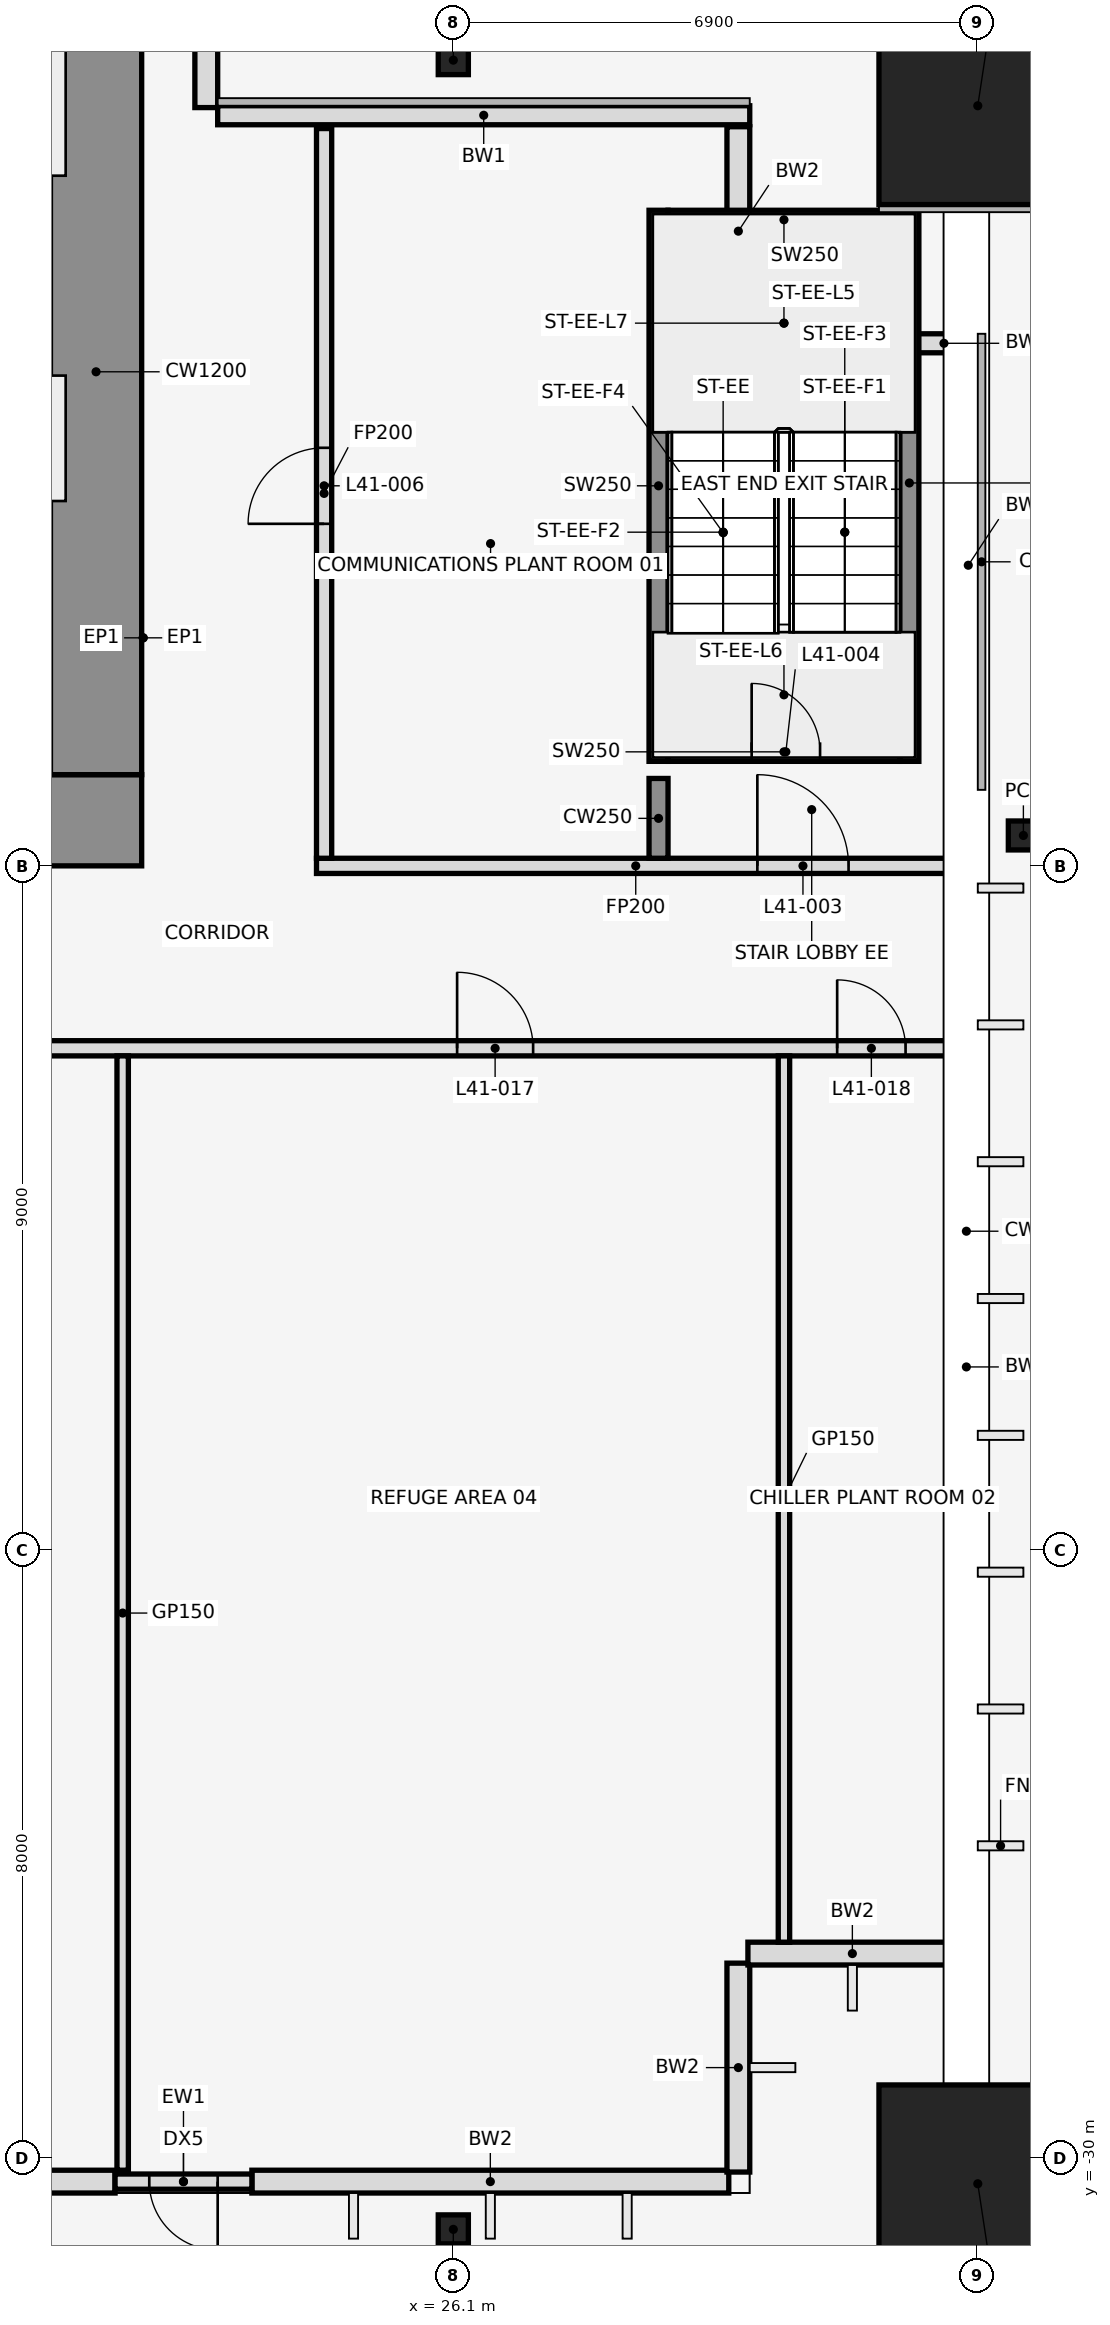
"""IFC4 building model, lengths in metres.
Left out: names, types, materials, properties, quantities, classifications, styles, units other than length and angle.
Written with IfcOpenShell. Run it as: python <this file> out.ifc"""

import sys

from ifc_helpers import new_model, si_unit, direction, frame, frame_2d, origin, origin_2d, place, context, subcontext, project, spatial, rectangle, hollow_rectangle, i_section, extrude, element, fill, save


model = new_model("IFC4")
c1 = context("Model", 3, precision=1e-05, world=origin(), true_north=direction((0.0, 1.0)))
c2 = subcontext(c1, "Body", "Model", "MODEL_VIEW")
j1 = project(units=[si_unit("LENGTHUNIT", "METRE"), si_unit("PLANEANGLEUNIT", "RADIAN")], contexts=[c1])
p1 = place(None, origin())
s1 = spatial("IfcSite", under=j1, at=p1, CompositionType="ELEMENT")
p2 = place(p1, origin())
s2 = spatial("IfcBuilding", under=s1, at=p2, CompositionType="ELEMENT")
p3 = place(p2, frame((0.0, 0.0, 185.5)))
s3 = spatial("IfcBuildingStorey", under=s2, at=p3, CompositionType="ELEMENT", Elevation=185.5)
for number, where, z_axis, x_axis in (
    (1, (26.1, -30.938, 0.0), (0.0, 0.0, 1.0), (1.0, 0.0, 0.0)),
    (2, (26.1, -2.4, 0.0), (0.0, 0.0, 1.0), (1.0, 0.0, 0.0)),
):
    element("IfcColumn", number, at=place(p3, frame(where, z_axis=z_axis, x_axis=x_axis)), inside=s3, PredefinedType="COLUMN", context=c2, shape_type="SweptSolid", body=[
        extrude(i_section(OverallWidth=0.396, OverallDepth=0.381, WebThickness=0.019, FlangeThickness=0.03, at=origin_2d()), origin(), (0.0, 0.0, 1.0), 5.4),
    ])
for number, where, z_axis, x_axis in (
    (3, (33.0, -30.338, 0.0), (0.0, 0.0, 1.0), (1.0, 0.0, 0.0)),
    (4, (33.0, -3.0, 0.0), (0.0, 0.0, 1.0), (1.0, 0.0, 0.0)),
):
    element("IfcColumn", number, at=place(p3, frame(where, z_axis=z_axis, x_axis=x_axis)), inside=s3, PredefinedType="COLUMN", context=c2, shape_type="SweptSolid", body=[
        extrude(hollow_rectangle(XDim=2.6, YDim=2.6, WallThickness=0.08, at=origin_2d()), origin(), (0.0, 0.0, 1.0), 5.4),
    ])
p4 = place(p3, frame((33.6, -12.6, 0.0), z_axis=(0.0, 0.0, 1.0), x_axis=(1.0, 0.0, 0.0)))
e5 = element("IfcColumn", 5, at=p4, inside=s3, PredefinedType="COLUMN", context=c2, shape_type="SweptSolid", body=[
    extrude(i_section(OverallWidth=0.396, OverallDepth=0.381, WebThickness=0.019, FlangeThickness=0.03, at=origin_2d()), origin(), (0.0, 0.0, 1.0), 5.4),
])
p5 = place(p3, frame((32.85, -27.184, 0.0), z_axis=(0.0, 0.0, 1.0), x_axis=(0.0, 1.0, 0.0)))
e6 = element("IfcWall", 6, at=p5, inside=s3, PredefinedType="STANDARD", context=c2, shape_type="SweptSolid", body=[
    extrude(rectangle(XDim=15.184, YDim=0.3, at=frame_2d((7.592, 0.0))), origin(), (0.0, 0.0, 1.0), 4.338),
])
for number, where, z_axis, x_axis in (
    (7, (29.85, -6.024, 0.0), (0.0, 0.0, 1.0), (0.0, 1.0, 0.0)),
    (8, (22.85, -3.024, 0.0), (0.0, 0.0, 1.0), (0.0, 1.0, 0.0)),
):
    element("IfcWall", number, at=place(p3, frame(where, z_axis=z_axis, x_axis=x_axis)), inside=s3, PredefinedType="STANDARD", context=c2, shape_type="SweptSolid", body=[
        extrude(rectangle(XDim=2.748, YDim=0.3, at=frame_2d((1.374, 0.0))), origin(), (0.0, 0.0, 1.0), 5.25),
    ])
p6 = place(p3, frame((15.615, -30.31, 0.0), z_axis=(0.0, 0.0, 1.0), x_axis=(1.0, 0.0, 0.0)))
e9 = element("IfcWall", 9, at=p6, inside=s3, PredefinedType="STANDARD", context=c2, shape_type="SweptSolid", body=[
    extrude(rectangle(XDim=6.035, YDim=0.3, at=frame_2d((3.018, 0.0))), origin(), (0.0, 0.0, 1.0), 4.414),
])
p7 = place(p3, frame((23.45, -30.31, 0.0), z_axis=(0.0, 0.0, 1.0), x_axis=(1.0, 0.0, 0.0)))
e10 = element("IfcWall", 10, at=p7, inside=s3, PredefinedType="STANDARD", context=c2, shape_type="SweptSolid", body=[
    extrude(rectangle(XDim=6.274, YDim=0.3, at=frame_2d((3.137, 0.0))), origin(), (0.0, 0.0, 1.0), 4.414),
])
for number, where, z_axis, x_axis in (
    (11, (29.85, -30.184, 0.0), (0.0, 0.0, 1.0), (0.0, 1.0, 0.0)),
    (12, (29.976, -27.31, 0.0), (0.0, 0.0, 1.0), (1.0, 0.0, 0.0)),
):
    element("IfcWall", number, at=place(p3, frame(where, z_axis=z_axis, x_axis=x_axis)), inside=s3, PredefinedType="STANDARD", context=c2, shape_type="SweptSolid", body=[
        extrude(rectangle(XDim=2.748, YDim=0.3, at=frame_2d((1.374, 0.0))), origin(), (0.0, 0.0, 1.0), 4.414),
    ])
p8 = place(p3, frame((23.45, -30.31, 0.0), z_axis=(0.0, 0.0, 1.0), x_axis=(-1.0, 0.0, 0.0)))
e13 = element("IfcWall", 13, at=p8, inside=s3, PredefinedType="STANDARD", context=c2, shape_type="SweptSolid", body=[
    extrude(rectangle(XDim=1.8, YDim=0.2, at=frame_2d((0.9, 0.0))), origin(), (0.0, 0.0, 1.0), 5.25),
])
p9 = place(p8, frame((0.45, 0.0, 0.0)))
e14 = element("IfcOpeningElement", 14, at=p9, cuts=e13, PredefinedType="OPENING", context=c2, shape_type="SweptSolid", body=[
    extrude(rectangle(XDim=0.9, YDim=2.1, at=frame_2d((0.45, 1.05))), frame((0.0, 0.112, 0.0), z_axis=(0.0, -1.0, 0.0), x_axis=(1.0, 0.0, 0.0)), (0.0, 0.0, 1.0), 0.224),
])
p10 = place(p3, frame((32.875, -12.09, 0.0), z_axis=(0.0, 0.0, 1.0), x_axis=(0.0, 1.0, 0.0)))
e15 = element("IfcWall", 15, at=p10, inside=s3, PredefinedType="STANDARD", context=c2, shape_type="SweptSolid", body=[
    extrude(rectangle(XDim=6.09, YDim=0.25, at=frame_2d((3.045, 0.0))), origin(), (0.0, 0.0, 1.0), 5.25),
])
p11 = place(p3, frame((33.0, -6.125, 0.0), z_axis=(0.0, 0.0, 1.0), x_axis=(-1.0, 0.0, 0.0)))
e16 = element("IfcWall", 16, at=p11, inside=s3, PredefinedType="STANDARD", context=c2, shape_type="SweptSolid", body=[
    extrude(rectangle(XDim=0.89, YDim=0.25, at=frame_2d((0.445, 0.0))), origin(), (0.0, 0.0, 1.0), 5.25),
])
p12 = place(p3, frame((30.0, -3.125, 0.0), z_axis=(0.0, 0.0, 1.0), x_axis=(-1.0, 0.0, 0.0)))
e17 = element("IfcWall", 17, at=p12, inside=s3, PredefinedType="STANDARD", context=c2, shape_type="SweptSolid", body=[
    extrude(rectangle(XDim=7.0, YDim=0.25, at=frame_2d((3.5, 0.0))), origin(), (0.0, 0.0, 1.0), 5.25),
])
p13 = place(p3, frame((28.8, -11.625, 0.0), z_axis=(0.0, 0.0, 1.0), x_axis=(0.0, 1.0, 0.0)))
e18 = element("IfcWall", 18, at=p13, inside=s3, PredefinedType="SHEAR", context=c2, shape_type="SweptSolid", body=[
    extrude(rectangle(XDim=7.25, YDim=0.25, at=frame_2d((3.625, 0.0))), origin(), (0.0, 0.0, 1.0), 5.4),
])
p14 = place(p3, frame((32.1, -11.625, 0.0), z_axis=(0.0, 0.0, 1.0), x_axis=(0.0, 1.0, 0.0)))
e19 = element("IfcWall", 19, at=p14, inside=s3, PredefinedType="SHEAR", context=c2, shape_type="SweptSolid", body=[
    extrude(rectangle(XDim=7.325, YDim=0.25, at=frame_2d((3.663, 0.0))), origin(), (0.0, 0.0, 1.0), 5.4),
])
p15 = place(p3, frame((28.925, -11.5, 0.0), z_axis=(0.0, 0.0, 1.0), x_axis=(1.0, 0.0, 0.0)))
e20 = element("IfcWall", 20, at=p15, inside=s3, PredefinedType="SHEAR", context=c2, shape_type="SweptSolid", body=[
    extrude(rectangle(XDim=3.05, YDim=0.25, at=frame_2d((1.525, 0.0))), origin(), (0.0, 0.0, 1.0), 5.4),
])
p16 = place(p15, frame((1.1, 0.0, 0.0)))
e21 = element("IfcOpeningElement", 21, at=p16, cuts=e20, PredefinedType="OPENING", context=c2, shape_type="SweptSolid", body=[
    extrude(rectangle(XDim=0.9, YDim=2.1, at=frame_2d((0.45, 1.05))), frame((0.0, 0.137, 0.0), z_axis=(0.0, -1.0, 0.0), x_axis=(1.0, 0.0, 0.0)), (0.0, 0.0, 1.0), 0.274),
])
p17 = place(p3, frame((28.925, -4.5, 0.0), z_axis=(0.0, 0.0, 1.0), x_axis=(1.0, 0.0, 0.0)))
e22 = element("IfcWall", 22, at=p17, inside=s3, PredefinedType="SHEAR", context=c2, shape_type="SweptSolid", body=[
    extrude(rectangle(XDim=3.05, YDim=0.25, at=frame_2d((1.525, 0.0))), origin(), (0.0, 0.0, 1.0), 5.4),
])
p18 = place(p3, frame((-32.7, -15.4, 0.0), z_axis=(0.0, 0.0, 1.0), x_axis=(1.0, 0.0, 0.0)))
e23 = element("IfcWall", 23, at=p18, inside=s3, PredefinedType="PARTITIONING", context=c2, shape_type="SweptSolid", body=[
    extrude(rectangle(XDim=65.4, YDim=0.2, at=frame_2d((32.7, 0.0))), origin(), (0.0, 0.0, 1.0), 4.26),
])
p19 = place(p18, frame((0.7, 0.0, 0.0)))
e24 = element("IfcOpeningElement", 24, at=p19, cuts=e23, PredefinedType="OPENING", context=c2, shape_type="SweptSolid", body=[
    extrude(rectangle(XDim=0.9, YDim=2.1, at=frame_2d((0.45, 1.05))), frame((0.0, 0.112, 0.0), z_axis=(0.0, -1.0, 0.0), x_axis=(1.0, 0.0, 0.0)), (0.0, 0.0, 1.0), 0.224),
])
p20 = place(p18, frame((5.55, 0.0, 0.0)))
e25 = element("IfcOpeningElement", 25, at=p20, cuts=e23, PredefinedType="OPENING", context=c2, shape_type="SweptSolid", body=[
    extrude(rectangle(XDim=1.0, YDim=2.1, at=frame_2d((0.5, 1.05))), frame((0.0, 0.112, 0.0), z_axis=(0.0, -1.0, 0.0), x_axis=(1.0, 0.0, 0.0)), (0.0, 0.0, 1.0), 0.224),
])
p21 = place(p18, frame((14.85, 0.0, 0.0)))
e26 = element("IfcOpeningElement", 26, at=p21, cuts=e23, PredefinedType="OPENING", context=c2, shape_type="SweptSolid", body=[
    extrude(rectangle(XDim=0.9, YDim=2.1, at=frame_2d((0.45, 1.05))), frame((0.0, 0.112, 0.0), z_axis=(0.0, -1.0, 0.0), x_axis=(1.0, 0.0, 0.0)), (0.0, 0.0, 1.0), 0.224),
])
p22 = place(p18, frame((23.55, 0.0, 0.0)))
e27 = element("IfcOpeningElement", 27, at=p22, cuts=e23, PredefinedType="OPENING", context=c2, shape_type="SweptSolid", body=[
    extrude(rectangle(XDim=1.0, YDim=2.1, at=frame_2d((0.5, 1.05))), frame((0.0, 0.112, 0.0), z_axis=(0.0, -1.0, 0.0), x_axis=(1.0, 0.0, 0.0)), (0.0, 0.0, 1.0), 0.224),
])
p23 = place(p18, frame((32.15, 0.0, 0.0)))
e28 = element("IfcOpeningElement", 28, at=p23, cuts=e23, PredefinedType="OPENING", context=c2, shape_type="SweptSolid", body=[
    extrude(rectangle(XDim=1.0, YDim=2.1, at=frame_2d((0.5, 1.05))), frame((0.0, 0.112, 0.0), z_axis=(0.0, -1.0, 0.0), x_axis=(1.0, 0.0, 0.0)), (0.0, 0.0, 1.0), 0.224),
])
p24 = place(p18, frame((40.95, 0.0, 0.0)))
e29 = element("IfcOpeningElement", 29, at=p24, cuts=e23, PredefinedType="OPENING", context=c2, shape_type="SweptSolid", body=[
    extrude(rectangle(XDim=1.0, YDim=2.1, at=frame_2d((0.5, 1.05))), frame((0.0, 0.112, 0.0), z_axis=(0.0, -1.0, 0.0), x_axis=(1.0, 0.0, 0.0)), (0.0, 0.0, 1.0), 0.224),
])
p25 = place(p18, frame((49.55, 0.0, 0.0)))
e30 = element("IfcOpeningElement", 30, at=p25, cuts=e23, PredefinedType="OPENING", context=c2, shape_type="SweptSolid", body=[
    extrude(rectangle(XDim=1.0, YDim=2.1, at=frame_2d((0.5, 1.05))), frame((0.0, 0.112, 0.0), z_axis=(0.0, -1.0, 0.0), x_axis=(1.0, 0.0, 0.0)), (0.0, 0.0, 1.0), 0.224),
])
p26 = place(p18, frame((58.85, 0.0, 0.0)))
e31 = element("IfcOpeningElement", 31, at=p26, cuts=e23, PredefinedType="OPENING", context=c2, shape_type="SweptSolid", body=[
    extrude(rectangle(XDim=1.0, YDim=2.1, at=frame_2d((0.5, 1.05))), frame((0.0, 0.112, 0.0), z_axis=(0.0, -1.0, 0.0), x_axis=(1.0, 0.0, 0.0)), (0.0, 0.0, 1.0), 0.224),
])
p27 = place(p18, frame((63.85, 0.0, 0.0)))
e32 = element("IfcOpeningElement", 32, at=p27, cuts=e23, PredefinedType="OPENING", context=c2, shape_type="SweptSolid", body=[
    extrude(rectangle(XDim=0.9, YDim=2.1, at=frame_2d((0.45, 1.05))), frame((0.0, 0.112, 0.0), z_axis=(0.0, -1.0, 0.0), x_axis=(1.0, 0.0, 0.0)), (0.0, 0.0, 1.0), 0.224),
])
p28 = place(p3, frame((24.3, -13.0, 0.0), z_axis=(0.0, 0.0, 1.0), x_axis=(1.0, 0.0, 0.0)))
e33 = element("IfcWall", 33, at=p28, inside=s3, PredefinedType="PARTITIONING", context=c2, shape_type="SweptSolid", body=[
    extrude(rectangle(XDim=8.4, YDim=0.2, at=frame_2d((4.2, 0.0))), origin(), (0.0, 0.0, 1.0), 4.26),
])
p29 = place(p28, frame((5.8, 0.0, 0.0)))
e34 = element("IfcOpeningElement", 34, at=p29, cuts=e33, PredefinedType="OPENING", context=c2, shape_type="SweptSolid", body=[
    extrude(rectangle(XDim=1.2, YDim=2.1, at=frame_2d((0.6, 1.05))), frame((0.0, 0.112, 0.0), z_axis=(0.0, -1.0, 0.0), x_axis=(1.0, 0.0, 0.0)), (0.0, 0.0, 1.0), 0.224),
])
p30 = place(p3, frame((21.75, -30.16, 0.0), z_axis=(0.0, 0.0, 1.0), x_axis=(0.0, 1.0, 0.0)))
e35 = element("IfcWall", 35, at=p30, inside=s3, PredefinedType="PARTITIONING", context=c2, shape_type="SweptSolid", body=[
    extrude(rectangle(XDim=14.66, YDim=0.15, at=frame_2d((7.33, 0.0))), origin(), (0.0, 0.0, 1.0), 4.26),
])
p31 = place(p3, frame((24.4, -12.9, 0.0), z_axis=(0.0, 0.0, 1.0), x_axis=(0.0, 1.0, 0.0)))
e36 = element("IfcWall", 36, at=p31, inside=s3, PredefinedType="PARTITIONING", context=c2, shape_type="SweptSolid", body=[
    extrude(rectangle(XDim=9.6, YDim=0.2, at=frame_2d((4.8, 0.0))), origin(), (0.0, 0.0, 1.0), 4.26),
])
p32 = place(p31, frame((4.4, 0.0, 0.0)))
e37 = element("IfcOpeningElement", 37, at=p32, cuts=e36, PredefinedType="OPENING", context=c2, shape_type="SweptSolid", body=[
    extrude(rectangle(XDim=1.0, YDim=2.1, at=frame_2d((0.5, 1.05))), frame((0.0, 0.112, 0.0), z_axis=(0.0, -1.0, 0.0), x_axis=(1.0, 0.0, 0.0)), (0.0, 0.0, 1.0), 0.224),
])
p33 = place(p3, frame((28.8, -12.9, 0.0), z_axis=(0.0, 0.0, 1.0), x_axis=(0.0, 1.0, 0.0)))
e38 = element("IfcWall", 38, at=p33, inside=s3, PredefinedType="SHEAR", context=c2, shape_type="SweptSolid", body=[
    extrude(rectangle(XDim=1.05, YDim=0.25, at=frame_2d((0.525, 0.0))), origin(), (0.0, 0.0, 1.0), 5.4),
])
p34 = place(p3, frame((30.45, -27.16, 0.0), z_axis=(0.0, 0.0, 1.0), x_axis=(0.0, 1.0, 0.0)))
e39 = element("IfcWall", 39, at=p34, inside=s3, PredefinedType="PARTITIONING", context=c2, shape_type="SweptSolid", body=[
    extrude(rectangle(XDim=11.66, YDim=0.15, at=frame_2d((5.83, 0.0))), origin(), (0.0, 0.0, 1.0), 4.26),
])
p35 = place(p3, frame((-22.0, -12.4, 0.0), z_axis=(0.0, 0.0, 1.0), x_axis=(1.0, 0.0, 0.0)))
e40 = element("IfcWall", 40, at=p35, inside=s3, PredefinedType="SHEAR", context=c2, shape_type="SweptSolid", body=[
    extrude(rectangle(XDim=44.0, YDim=1.2, at=frame_2d((22.0, 0.0))), origin(), (0.0, 0.0, 1.0), 5.4),
])
p36 = place(p35, frame((2.2, 0.0, 0.0)))
e41 = element("IfcOpeningElement", 41, at=p36, cuts=e40, PredefinedType="OPENING", context=c2, shape_type="SweptSolid", body=[
    extrude(rectangle(XDim=1.2, YDim=2.1, at=frame_2d((0.6, 1.05))), frame((0.0, 0.612, 0.0), z_axis=(0.0, -1.0, 0.0), x_axis=(1.0, 0.0, 0.0)), (0.0, 0.0, 1.0), 1.224),
])
p37 = place(p35, frame((21.4, 0.0, 0.0)))
e42 = element("IfcOpeningElement", 42, at=p37, cuts=e40, PredefinedType="OPENING", context=c2, shape_type="SweptSolid", body=[
    extrude(rectangle(XDim=1.2, YDim=2.1, at=frame_2d((0.6, 1.05))), frame((0.0, 0.612, 0.0), z_axis=(0.0, -1.0, 0.0), x_axis=(1.0, 0.0, 0.0)), (0.0, 0.0, 1.0), 1.224),
])
p38 = place(p35, frame((40.6, 0.0, 0.0)))
e43 = element("IfcOpeningElement", 43, at=p38, cuts=e40, PredefinedType="OPENING", context=c2, shape_type="SweptSolid", body=[
    extrude(rectangle(XDim=1.2, YDim=2.1, at=frame_2d((0.6, 1.05))), frame((0.0, 0.612, 0.0), z_axis=(0.0, -1.0, 0.0), x_axis=(1.0, 0.0, 0.0)), (0.0, 0.0, 1.0), 1.224),
])
p39 = place(p35, frame((16.0, 0.0, 0.0)))
e44 = element("IfcOpeningElement", 44, at=p39, cuts=e40, PredefinedType="OPENING", context=c2, shape_type="SweptSolid", body=[
    extrude(rectangle(XDim=1.8, YDim=2.1, at=frame_2d((0.9, 1.05))), frame((0.0, 0.612, 0.0), z_axis=(0.0, -1.0, 0.0), x_axis=(1.0, 0.0, 0.0)), (0.0, 0.0, 1.0), 1.224),
])
p40 = place(p35, frame((6.3, 0.0, 0.0)))
e45 = element("IfcOpeningElement", 45, at=p40, cuts=e40, PredefinedType="OPENING", context=c2, shape_type="SweptSolid", body=[
    extrude(rectangle(XDim=1.2, YDim=2.1, at=frame_2d((0.6, 1.05))), frame((0.0, 0.612, 0.0), z_axis=(0.0, -1.0, 0.0), x_axis=(1.0, 0.0, 0.0)), (0.0, 0.0, 1.0), 1.224),
])
p41 = place(p35, frame((26.2, 0.0, 0.0)))
e46 = element("IfcOpeningElement", 46, at=p41, cuts=e40, PredefinedType="OPENING", context=c2, shape_type="SweptSolid", body=[
    extrude(rectangle(XDim=1.8, YDim=2.1, at=frame_2d((0.9, 1.05))), frame((0.0, 0.612, 0.0), z_axis=(0.0, -1.0, 0.0), x_axis=(1.0, 0.0, 0.0)), (0.0, 0.0, 1.0), 1.224),
])
p42 = place(p35, frame((36.5, 0.0, 0.0)))
e47 = element("IfcOpeningElement", 47, at=p42, cuts=e40, PredefinedType="OPENING", context=c2, shape_type="SweptSolid", body=[
    extrude(rectangle(XDim=1.2, YDim=2.1, at=frame_2d((0.6, 1.05))), frame((0.0, 0.612, 0.0), z_axis=(0.0, -1.0, 0.0), x_axis=(1.0, 0.0, 0.0)), (0.0, 0.0, 1.0), 1.224),
])
p43 = place(p3, frame((21.4, -11.8, 0.0), z_axis=(0.0, 0.0, 1.0), x_axis=(0.0, 1.0, 0.0)))
e48 = element("IfcWall", 48, at=p43, inside=s3, PredefinedType="SHEAR", context=c2, shape_type="SweptSolid", body=[
    extrude(rectangle(XDim=10.6, YDim=1.2, at=frame_2d((5.3, 0.0))), origin(), (0.0, 0.0, 1.0), 5.4),
])
p44 = place(p9, origin())
e49 = element("IfcDoor", 49, at=p44, inside=s3, OperationType="SINGLE_SWING_LEFT", PredefinedType="DOOR", context=c2, shape_type="SweptSolid", body=[
    extrude(rectangle(XDim=0.9, YDim=2.1, at=frame_2d((0.45, 1.05))), frame((0.0, 0.025, 0.0), z_axis=(0.0, -1.0, 0.0), x_axis=(1.0, 0.0, 0.0)), (0.0, 0.0, 1.0), 0.05),
])
fill(e14, e49)
p45 = place(p29, origin())
e50 = element("IfcDoor", 50, at=p45, inside=s3, OperationType="SINGLE_SWING_RIGHT", PredefinedType="DOOR", context=c2, shape_type="SweptSolid", body=[
    extrude(rectangle(XDim=1.2, YDim=2.1, at=frame_2d((0.6, 1.05))), frame((0.0, 0.025, 0.0), z_axis=(0.0, -1.0, 0.0), x_axis=(1.0, 0.0, 0.0)), (0.0, 0.0, 1.0), 0.05),
])
fill(e34, e50)
p46 = place(p16, origin())
e51 = element("IfcDoor", 51, at=p46, inside=s3, OperationType="SINGLE_SWING_LEFT", PredefinedType="DOOR", context=c2, shape_type="SweptSolid", body=[
    extrude(rectangle(XDim=0.9, YDim=2.1, at=frame_2d((0.45, 1.05))), frame((0.0, 0.025, 0.0), z_axis=(0.0, -1.0, 0.0), x_axis=(1.0, 0.0, 0.0)), (0.0, 0.0, 1.0), 0.05),
])
fill(e21, e51)
p47 = place(p32, frame((1.0, 0.0, 0.0), z_axis=(0.0, 0.0, 1.0), x_axis=(-1.0, 0.0, 0.0)))
e52 = element("IfcDoor", 52, at=p47, inside=s3, OperationType="SINGLE_SWING_RIGHT", PredefinedType="DOOR", context=c2, shape_type="SweptSolid", body=[
    extrude(rectangle(XDim=1.0, YDim=2.1, at=frame_2d((0.5, 1.05))), frame((0.0, 0.025, 0.0), z_axis=(0.0, -1.0, 0.0), x_axis=(1.0, 0.0, 0.0)), (0.0, 0.0, 1.0), 0.05),
])
fill(e37, e52)
p48 = place(p26, frame((1.0, 0.0, 0.0), z_axis=(0.0, 0.0, 1.0), x_axis=(-1.0, 0.0, 0.0)))
e53 = element("IfcDoor", 53, at=p48, inside=s3, OperationType="SINGLE_SWING_RIGHT", PredefinedType="DOOR", context=c2, shape_type="SweptSolid", body=[
    extrude(rectangle(XDim=1.0, YDim=2.1, at=frame_2d((0.5, 1.05))), frame((0.0, 0.025, 0.0), z_axis=(0.0, -1.0, 0.0), x_axis=(1.0, 0.0, 0.0)), (0.0, 0.0, 1.0), 0.05),
])
fill(e31, e53)
p49 = place(p27, frame((0.9, 0.0, 0.0), z_axis=(0.0, 0.0, 1.0), x_axis=(-1.0, 0.0, 0.0)))
e54 = element("IfcDoor", 54, at=p49, inside=s3, OperationType="SINGLE_SWING_RIGHT", PredefinedType="DOOR", context=c2, shape_type="SweptSolid", body=[
    extrude(rectangle(XDim=0.9, YDim=2.1, at=frame_2d((0.45, 1.05))), frame((0.0, 0.025, 0.0), z_axis=(0.0, -1.0, 0.0), x_axis=(1.0, 0.0, 0.0)), (0.0, 0.0, 1.0), 0.05),
])
fill(e32, e54)
save(model, sys.argv[1])
